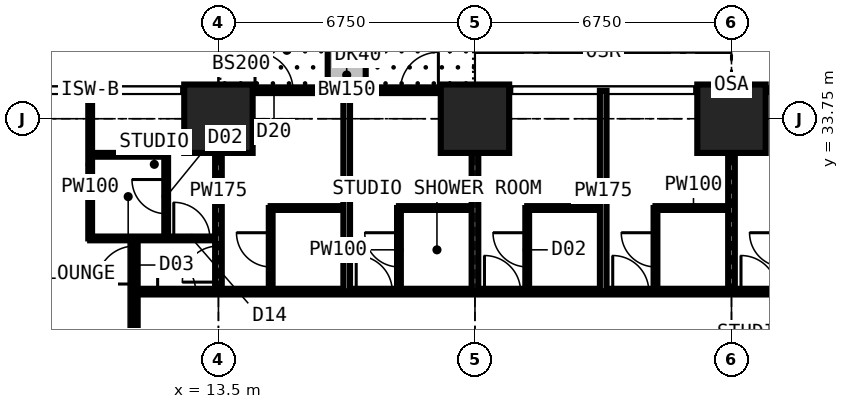
"""IFC4 building model, lengths in metres.
Left out: names, types, materials, properties, quantities, classifications, styles, units other than length and angle.
Written with IfcOpenShell. Run it as: python <this file> out.ifc"""

import sys

from ifc_helpers import new_model, si_unit, direction, frame, frame_2d, origin, origin_2d, place, context, subcontext, project, spatial, rectangle, extrude, element, fill, save


model = new_model("IFC4")
c1 = context("Model", 3, precision=1e-05, world=origin(), true_north=direction((0.0, 1.0)))
c2 = subcontext(c1, "Body", "Model", "MODEL_VIEW")
j1 = project(units=[si_unit("LENGTHUNIT", "METRE"), si_unit("PLANEANGLEUNIT", "RADIAN")], contexts=[c1])
p1 = place(None, origin())
s1 = spatial("IfcSite", under=j1, at=p1, CompositionType="ELEMENT")
p2 = place(p1, origin())
s2 = spatial("IfcBuilding", under=s1, at=p2, CompositionType="ELEMENT")
p3 = place(p2, frame((0.0, 0.0, 87.3)))
s3 = spatial("IfcBuildingStorey", under=s2, at=p3, CompositionType="ELEMENT", Elevation=87.3)
for number, where, z_axis, x_axis in (
    (1, (13.5, 33.75, 0.0), (0.0, 0.0, 1.0), (1.0, 0.0, 0.0)),
    (2, (20.25, 33.75, 0.0), (0.0, 0.0, 1.0), (1.0, 0.0, 0.0)),
    (3, (27.0, 33.75, 0.0), (0.0, 0.0, 1.0), (1.0, 0.0, 0.0)),
):
    element("IfcColumn", number, at=place(p3, frame(where, z_axis=z_axis, x_axis=x_axis)), inside=s3, PredefinedType="COLUMN", context=c2, shape_type="SweptSolid", body=[
        extrude(rectangle(XDim=1.8, YDim=1.8, at=origin_2d()), origin(), (0.0, 0.0, 1.0), 3.6),
    ])
p4 = place(p3, frame((13.5, 34.5, 0.0), z_axis=(0.0, 0.0, 1.0), x_axis=(1.0, 0.0, 0.0)))
e4 = element("IfcWall", 4, at=p4, inside=s3, PredefinedType="SOLIDWALL", context=c2, shape_type="SweptSolid", body=[
    extrude(rectangle(XDim=6.75, YDim=0.15, at=frame_2d((3.375, 0.0))), origin(), (0.0, 0.0, 1.0), 3.375),
])
p5 = place(p4, frame((0.962, 0.0, 0.0)))
e5 = element("IfcOpeningElement", 5, at=p5, cuts=e4, PredefinedType="OPENING", context=c2, shape_type="SweptSolid", body=[
    extrude(rectangle(XDim=1.0, YDim=2.2, at=frame_2d((0.5, 1.1))), frame((0.0, 0.085, 0.0), z_axis=(0.0, -1.0, 0.0), x_axis=(1.0, 0.0, 0.0)), (0.0, 0.0, 1.0), 0.17),
])
p6 = place(p4, frame((2.025, 0.0, 0.9)))
e6 = element("IfcOpeningElement", 6, at=p6, cuts=e4, PredefinedType="OPENING", context=c2, shape_type="SweptSolid", body=[
    extrude(rectangle(XDim=1.2, YDim=1.8, at=frame_2d((0.6, 0.9))), frame((0.0, 0.085, 0.0), z_axis=(0.0, -1.0, 0.0), x_axis=(1.0, 0.0, 0.0)), (0.0, 0.0, 1.0), 0.17),
])
p7 = place(p4, frame((4.788, 0.0, 0.0)))
e7 = element("IfcOpeningElement", 7, at=p7, cuts=e4, PredefinedType="OPENING", context=c2, shape_type="SweptSolid", body=[
    extrude(rectangle(XDim=1.0, YDim=2.2, at=frame_2d((0.5, 1.1))), frame((0.0, 0.085, 0.0), z_axis=(0.0, -1.0, 0.0), x_axis=(1.0, 0.0, 0.0)), (0.0, 0.0, 1.0), 0.17),
])
p8 = place(p4, frame((3.525, 0.0, 0.9)))
e8 = element("IfcOpeningElement", 8, at=p8, cuts=e4, PredefinedType="OPENING", context=c2, shape_type="SweptSolid", body=[
    extrude(rectangle(XDim=1.2, YDim=1.8, at=frame_2d((0.6, 0.9))), frame((0.0, 0.085, 0.0), z_axis=(0.0, -1.0, 0.0), x_axis=(1.0, 0.0, 0.0)), (0.0, 0.0, 1.0), 0.17),
])
p9 = place(p3, frame((16.875, 34.6, 0.0), z_axis=(0.0, 0.0, 1.0), x_axis=(0.0, 1.0, 0.0)))
e9 = element("IfcWall", 9, at=p9, inside=s3, PredefinedType="USERDEFINED", context=c2, shape_type="SweptSolid", body=[
    extrude(rectangle(XDim=2.2, YDim=1.0, at=frame_2d((1.1, 0.0))), origin(), (0.0, 0.0, 1.0), 0.9),
])
p10 = place(p3, frame((10.125, 30.6, 0.0), z_axis=(0.0, 0.0, 1.0), x_axis=(0.0, 1.0, 0.0)))
e10 = element("IfcWall", 10, at=p10, inside=s3, PredefinedType="PARTITIONING", context=c2, shape_type="SweptSolid", body=[
    extrude(rectangle(XDim=3.884, YDim=0.1, at=frame_2d((1.942, 0.0))), origin(), (0.0, 0.0, 1.0), 3.375),
])
p11 = place(p3, frame((10.125, 30.6, 0.0), z_axis=(0.0, 0.0, 1.0), x_axis=(1.0, 0.0, 0.0)))
e11 = element("IfcWall", 11, at=p11, inside=s3, PredefinedType="PARTITIONING", context=c2, shape_type="SweptSolid", body=[
    extrude(rectangle(XDim=3.375, YDim=0.1, at=frame_2d((1.688, 0.0))), origin(), (0.0, 0.0, 1.0), 3.375),
])
p12 = place(p11, frame((2.2, 0.0, 0.0)))
e12 = element("IfcOpeningElement", 12, at=p12, cuts=e11, PredefinedType="OPENING", context=c2, shape_type="SweptSolid", body=[
    extrude(rectangle(XDim=0.95, YDim=2.2, at=frame_2d((0.475, 1.1))), frame((0.0, 0.06, 0.0), z_axis=(0.0, -1.0, 0.0), x_axis=(1.0, 0.0, 0.0)), (0.0, 0.0, 1.0), 0.12),
])
p13 = place(p3, frame((10.125, 32.8, 0.0), z_axis=(0.0, 0.0, 1.0), x_axis=(1.0, 0.0, 0.0)))
e13 = element("IfcWall", 13, at=p13, inside=s3, PredefinedType="PARTITIONING", context=c2, shape_type="SweptSolid", body=[
    extrude(rectangle(XDim=2.0, YDim=0.1, at=frame_2d((1.0, 0.0))), origin(), (0.0, 0.0, 1.0), 3.375),
])
p14 = place(p3, frame((11.3, 11.3, 0.0), z_axis=(0.0, 0.0, 1.0), x_axis=(0.0, 1.0, 0.0)))
e14 = element("IfcWall", 14, at=p14, inside=s3, PredefinedType="PARTITIONING", context=c2, shape_type="SweptSolid", body=[
    extrude(rectangle(XDim=19.3, YDim=0.15, at=frame_2d((9.65, 0.0))), origin(), (0.0, 0.0, 1.0), 3.375),
])
p15 = place(p14, frame((18.1, 0.0, 0.0)))
e15 = element("IfcOpeningElement", 15, at=p15, cuts=e14, PredefinedType="OPENING", context=c2, shape_type="SweptSolid", body=[
    extrude(rectangle(XDim=1.0, YDim=2.2, at=frame_2d((0.5, 1.1))), frame((0.0, 0.085, 0.0), z_axis=(0.0, -1.0, 0.0), x_axis=(1.0, 0.0, 0.0)), (0.0, 0.0, 1.0), 0.17),
])
p16 = place(p14, frame((10.137, 0.0, 0.0)))
e16 = element("IfcOpeningElement", 16, at=p16, cuts=e14, PredefinedType="OPENING", context=c2, shape_type="SweptSolid", body=[
    extrude(rectangle(XDim=1.0, YDim=2.2, at=frame_2d((0.5, 1.1))), frame((0.0, 0.085, 0.0), z_axis=(0.0, -1.0, 0.0), x_axis=(1.0, 0.0, 0.0)), (0.0, 0.0, 1.0), 0.17),
])
p17 = place(p3, frame((11.3, 29.2, 0.0), z_axis=(0.0, 0.0, 1.0), x_axis=(1.0, 0.0, 0.0)))
e17 = element("IfcWall", 17, at=p17, inside=s3, PredefinedType="PARTITIONING", context=c2, shape_type="SweptSolid", body=[
    extrude(rectangle(XDim=19.075, YDim=0.15, at=frame_2d((9.538, 0.0))), origin(), (0.0, 0.0, 1.0), 3.375),
])
p18 = place(p17, frame((5.825, 0.0, 0.0)))
e18 = element("IfcOpeningElement", 18, at=p18, cuts=e17, PredefinedType="OPENING", context=c2, shape_type="SweptSolid", body=[
    extrude(rectangle(XDim=0.95, YDim=2.2, at=frame_2d((0.475, 1.1))), frame((0.0, 0.085, 0.0), z_axis=(0.0, -1.0, 0.0), x_axis=(1.0, 0.0, 0.0)), (0.0, 0.0, 1.0), 0.17),
])
p19 = place(p17, frame((9.2, 0.0, 0.0)))
e19 = element("IfcOpeningElement", 19, at=p19, cuts=e17, PredefinedType="OPENING", context=c2, shape_type="SweptSolid", body=[
    extrude(rectangle(XDim=0.95, YDim=2.2, at=frame_2d((0.475, 1.1))), frame((0.0, 0.085, 0.0), z_axis=(0.0, -1.0, 0.0), x_axis=(1.0, 0.0, 0.0)), (0.0, 0.0, 1.0), 0.17),
])
p20 = place(p17, frame((12.575, 0.0, 0.0)))
e20 = element("IfcOpeningElement", 20, at=p20, cuts=e17, PredefinedType="OPENING", context=c2, shape_type="SweptSolid", body=[
    extrude(rectangle(XDim=0.95, YDim=2.2, at=frame_2d((0.475, 1.1))), frame((0.0, 0.085, 0.0), z_axis=(0.0, -1.0, 0.0), x_axis=(1.0, 0.0, 0.0)), (0.0, 0.0, 1.0), 0.17),
])
p21 = place(p17, frame((15.95, 0.0, 0.0)))
e21 = element("IfcOpeningElement", 21, at=p21, cuts=e17, PredefinedType="OPENING", context=c2, shape_type="SweptSolid", body=[
    extrude(rectangle(XDim=0.95, YDim=2.2, at=frame_2d((0.475, 1.1))), frame((0.0, 0.085, 0.0), z_axis=(0.0, -1.0, 0.0), x_axis=(1.0, 0.0, 0.0)), (0.0, 0.0, 1.0), 0.17),
])
p22 = place(p17, frame((0.6, 0.0, 0.0)))
e22 = element("IfcOpeningElement", 22, at=p22, cuts=e17, PredefinedType="OPENING", context=c2, shape_type="SweptSolid", body=[
    extrude(rectangle(XDim=1.0, YDim=2.2, at=frame_2d((0.5, 1.1))), frame((0.0, 0.085, 0.0), z_axis=(0.0, -1.0, 0.0), x_axis=(1.0, 0.0, 0.0)), (0.0, 0.0, 1.0), 0.17),
])
p23 = place(p3, frame((12.125, 30.6, 0.0), z_axis=(0.0, 0.0, 1.0), x_axis=(0.0, 1.0, 0.0)))
e23 = element("IfcWall", 23, at=p23, inside=s3, PredefinedType="PARTITIONING", context=c2, shape_type="SweptSolid", body=[
    extrude(rectangle(XDim=2.2, YDim=0.1, at=frame_2d((1.1, 0.0))), origin(), (0.0, 0.0, 1.0), 3.375),
])
p24 = place(p23, frame((0.65, 0.0, 0.0)))
e24 = element("IfcOpeningElement", 24, at=p24, cuts=e23, PredefinedType="OPENING", context=c2, shape_type="SweptSolid", body=[
    extrude(rectangle(XDim=0.9, YDim=2.2, at=frame_2d((0.45, 1.1))), frame((0.0, 0.06, 0.0), z_axis=(0.0, -1.0, 0.0), x_axis=(1.0, 0.0, 0.0)), (0.0, 0.0, 1.0), 0.12),
])
p25 = place(p3, frame((13.5, 29.2, 0.0), z_axis=(0.0, 0.0, 1.0), x_axis=(0.0, 1.0, 0.0)))
e25 = element("IfcWall", 25, at=p25, inside=s3, PredefinedType="PARTITIONING", context=c2, shape_type="SweptSolid", body=[
    extrude(rectangle(XDim=5.284, YDim=0.175, at=frame_2d((2.642, 0.0))), origin(), (0.0, 0.0, 1.0), 2.806),
])
p26 = place(p25, frame((0.25, 0.0, 0.0)))
e26 = element("IfcOpeningElement", 26, at=p26, cuts=e25, PredefinedType="OPENING", context=c2, shape_type="SweptSolid", body=[
    extrude(rectangle(XDim=0.95, YDim=2.2, at=frame_2d((0.475, 1.1))), frame((0.0, 0.097, 0.0), z_axis=(0.0, -1.0, 0.0), x_axis=(1.0, 0.0, 0.0)), (0.0, 0.0, 1.0), 0.195),
])
p27 = place(p3, frame((14.875, 29.2, 0.0), z_axis=(0.0, 0.0, 1.0), x_axis=(0.0, 1.0, 0.0)))
e27 = element("IfcWall", 27, at=p27, inside=s3, PredefinedType="PARTITIONING", context=c2, shape_type="SweptSolid", body=[
    extrude(rectangle(XDim=2.2, YDim=0.1, at=frame_2d((1.1, 0.0))), origin(), (0.0, 0.0, 1.0), 3.375),
])
p28 = place(p27, frame((0.65, 0.0, 0.0)))
e28 = element("IfcOpeningElement", 28, at=p28, cuts=e27, PredefinedType="OPENING", context=c2, shape_type="SweptSolid", body=[
    extrude(rectangle(XDim=0.9, YDim=2.2, at=frame_2d((0.45, 1.1))), frame((0.0, 0.06, 0.0), z_axis=(0.0, -1.0, 0.0), x_axis=(1.0, 0.0, 0.0)), (0.0, 0.0, 1.0), 0.12),
])
p29 = place(p3, frame((14.875, 31.4, 0.0), z_axis=(0.0, 0.0, 1.0), x_axis=(1.0, 0.0, 0.0)))
e29 = element("IfcWall", 29, at=p29, inside=s3, PredefinedType="PARTITIONING", context=c2, shape_type="SweptSolid", body=[
    extrude(rectangle(XDim=2.0, YDim=0.1, at=frame_2d((1.0, 0.0))), origin(), (0.0, 0.0, 1.0), 3.375),
])
p30 = place(p3, frame((16.875, 29.2, 0.0), z_axis=(0.0, 0.0, 1.0), x_axis=(0.0, 1.0, 0.0)))
e30 = element("IfcWall", 30, at=p30, inside=s3, PredefinedType="PARTITIONING", context=c2, shape_type="SweptSolid", body=[
    extrude(rectangle(XDim=5.284, YDim=0.175, at=frame_2d((2.642, 0.0))), origin(), (0.0, 0.0, 1.0), 3.375),
])
p31 = place(p3, frame((18.25, 29.2, 0.0), z_axis=(0.0, 0.0, 1.0), x_axis=(0.0, 1.0, 0.0)))
e31 = element("IfcWall", 31, at=p31, inside=s3, PredefinedType="PARTITIONING", context=c2, shape_type="SweptSolid", body=[
    extrude(rectangle(XDim=2.2, YDim=0.1, at=frame_2d((1.1, 0.0))), origin(), (0.0, 0.0, 1.0), 3.375),
])
p32 = place(p31, frame((0.65, 0.0, 0.0)))
e32 = element("IfcOpeningElement", 32, at=p32, cuts=e31, PredefinedType="OPENING", context=c2, shape_type="SweptSolid", body=[
    extrude(rectangle(XDim=0.9, YDim=2.2, at=frame_2d((0.45, 1.1))), frame((0.0, 0.06, 0.0), z_axis=(0.0, -1.0, 0.0), x_axis=(1.0, 0.0, 0.0)), (0.0, 0.0, 1.0), 0.12),
])
p33 = place(p3, frame((18.25, 31.4, 0.0), z_axis=(0.0, 0.0, 1.0), x_axis=(1.0, 0.0, 0.0)))
e33 = element("IfcWall", 33, at=p33, inside=s3, PredefinedType="PARTITIONING", context=c2, shape_type="SweptSolid", body=[
    extrude(rectangle(XDim=2.0, YDim=0.1, at=frame_2d((1.0, 0.0))), origin(), (0.0, 0.0, 1.0), 3.375),
])
p34 = place(p3, frame((20.25, 29.2, 0.0), z_axis=(0.0, 0.0, 1.0), x_axis=(0.0, 1.0, 0.0)))
e34 = element("IfcWall", 34, at=p34, inside=s3, PredefinedType="PARTITIONING", context=c2, shape_type="SweptSolid", body=[
    extrude(rectangle(XDim=5.284, YDim=0.175, at=frame_2d((2.642, 0.0))), origin(), (0.0, 0.0, 1.0), 2.61),
])
p35 = place(p3, frame((21.625, 29.2, 0.0), z_axis=(0.0, 0.0, 1.0), x_axis=(0.0, 1.0, 0.0)))
e35 = element("IfcWall", 35, at=p35, inside=s3, PredefinedType="PARTITIONING", context=c2, shape_type="SweptSolid", body=[
    extrude(rectangle(XDim=2.2, YDim=0.1, at=frame_2d((1.1, 0.0))), origin(), (0.0, 0.0, 1.0), 3.375),
])
p36 = place(p35, frame((0.65, 0.0, 0.0)))
e36 = element("IfcOpeningElement", 36, at=p36, cuts=e35, PredefinedType="OPENING", context=c2, shape_type="SweptSolid", body=[
    extrude(rectangle(XDim=0.9, YDim=2.2, at=frame_2d((0.45, 1.1))), frame((0.0, 0.06, 0.0), z_axis=(0.0, -1.0, 0.0), x_axis=(1.0, 0.0, 0.0)), (0.0, 0.0, 1.0), 0.12),
])
p37 = place(p3, frame((21.625, 31.4, 0.0), z_axis=(0.0, 0.0, 1.0), x_axis=(1.0, 0.0, 0.0)))
e37 = element("IfcWall", 37, at=p37, inside=s3, PredefinedType="PARTITIONING", context=c2, shape_type="SweptSolid", body=[
    extrude(rectangle(XDim=2.0, YDim=0.1, at=frame_2d((1.0, 0.0))), origin(), (0.0, 0.0, 1.0), 3.375),
])
p38 = place(p3, frame((23.625, 29.2, 0.0), z_axis=(0.0, 0.0, 1.0), x_axis=(0.0, 1.0, 0.0)))
e38 = element("IfcWall", 38, at=p38, inside=s3, PredefinedType="PARTITIONING", context=c2, shape_type="SweptSolid", body=[
    extrude(rectangle(XDim=5.284, YDim=0.175, at=frame_2d((2.642, 0.0))), origin(), (0.0, 0.0, 1.0), 3.375),
])
p39 = place(p3, frame((25.0, 29.2, 0.0), z_axis=(0.0, 0.0, 1.0), x_axis=(0.0, 1.0, 0.0)))
e39 = element("IfcWall", 39, at=p39, inside=s3, PredefinedType="PARTITIONING", context=c2, shape_type="SweptSolid", body=[
    extrude(rectangle(XDim=2.2, YDim=0.1, at=frame_2d((1.1, 0.0))), origin(), (0.0, 0.0, 1.0), 3.375),
])
p40 = place(p39, frame((0.65, 0.0, 0.0)))
e40 = element("IfcOpeningElement", 40, at=p40, cuts=e39, PredefinedType="OPENING", context=c2, shape_type="SweptSolid", body=[
    extrude(rectangle(XDim=0.9, YDim=2.2, at=frame_2d((0.45, 1.1))), frame((0.0, 0.06, 0.0), z_axis=(0.0, -1.0, 0.0), x_axis=(1.0, 0.0, 0.0)), (0.0, 0.0, 1.0), 0.12),
])
p41 = place(p3, frame((25.0, 31.4, 0.0), z_axis=(0.0, 0.0, 1.0), x_axis=(1.0, 0.0, 0.0)))
e41 = element("IfcWall", 41, at=p41, inside=s3, PredefinedType="PARTITIONING", context=c2, shape_type="SweptSolid", body=[
    extrude(rectangle(XDim=2.0, YDim=0.1, at=frame_2d((1.0, 0.0))), origin(), (0.0, 0.0, 1.0), 3.375),
])
p42 = place(p3, frame((27.0, 29.2, 0.0), z_axis=(0.0, 0.0, 1.0), x_axis=(0.0, 1.0, 0.0)))
e42 = element("IfcWall", 42, at=p42, inside=s3, PredefinedType="PARTITIONING", context=c2, shape_type="SweptSolid", body=[
    extrude(rectangle(XDim=5.284, YDim=0.175, at=frame_2d((2.642, 0.0))), origin(), (0.0, 0.0, 1.0), 2.61),
])
p43 = place(p5, origin())
e43 = element("IfcDoor", 43, at=p43, inside=s3, OperationType="SINGLE_SWING_LEFT", PredefinedType="DOOR", context=c2, shape_type="SweptSolid", body=[
    extrude(rectangle(XDim=1.0, YDim=2.2, at=frame_2d((0.5, 1.1))), frame((0.0, 0.025, 0.0), z_axis=(0.0, -1.0, 0.0), x_axis=(1.0, 0.0, 0.0)), (0.0, 0.0, 1.0), 0.05),
])
fill(e5, e43)
p44 = place(p6, origin())
e44 = element("IfcWindow", 44, at=p44, inside=s3, PartitioningType="SINGLE_PANEL", PredefinedType="WINDOW", context=c2, shape_type="SweptSolid", body=[
    extrude(rectangle(XDim=1.2, YDim=1.8, at=frame_2d((0.6, 0.9))), frame((0.0, 0.03, 0.0), z_axis=(0.0, -1.0, 0.0), x_axis=(1.0, 0.0, 0.0)), (0.0, 0.0, 1.0), 0.06),
])
fill(e6, e44)
p45 = place(p7, origin())
e45 = element("IfcDoor", 45, at=p45, inside=s3, OperationType="SINGLE_SWING_RIGHT", PredefinedType="DOOR", context=c2, shape_type="SweptSolid", body=[
    extrude(rectangle(XDim=1.0, YDim=2.2, at=frame_2d((0.5, 1.1))), frame((0.0, 0.025, 0.0), z_axis=(0.0, -1.0, 0.0), x_axis=(1.0, 0.0, 0.0)), (0.0, 0.0, 1.0), 0.05),
])
fill(e7, e45)
p46 = place(p8, origin())
e46 = element("IfcWindow", 46, at=p46, inside=s3, PartitioningType="SINGLE_PANEL", PredefinedType="WINDOW", context=c2, shape_type="SweptSolid", body=[
    extrude(rectangle(XDim=1.2, YDim=1.8, at=frame_2d((0.6, 0.9))), frame((0.0, 0.03, 0.0), z_axis=(0.0, -1.0, 0.0), x_axis=(1.0, 0.0, 0.0)), (0.0, 0.0, 1.0), 0.06),
])
fill(e8, e46)
p47 = place(p12, origin())
e47 = element("IfcDoor", 47, at=p47, inside=s3, OperationType="SINGLE_SWING_LEFT", PredefinedType="DOOR", context=c2, shape_type="SweptSolid", body=[
    extrude(rectangle(XDim=0.95, YDim=2.2, at=frame_2d((0.475, 1.1))), frame((0.0, 0.025, 0.0), z_axis=(0.0, -1.0, 0.0), x_axis=(1.0, 0.0, 0.0)), (0.0, 0.0, 1.0), 0.05),
])
fill(e12, e47)
p48 = place(p24, origin())
e48 = element("IfcDoor", 48, at=p48, inside=s3, OperationType="SINGLE_SWING_RIGHT", PredefinedType="DOOR", context=c2, shape_type="SweptSolid", body=[
    extrude(rectangle(XDim=0.9, YDim=2.2, at=frame_2d((0.45, 1.1))), frame((0.0, 0.025, 0.0), z_axis=(0.0, -1.0, 0.0), x_axis=(1.0, 0.0, 0.0)), (0.0, 0.0, 1.0), 0.05),
])
fill(e24, e48)
p49 = place(p26, origin())
e49 = element("IfcDoor", 49, at=p49, inside=s3, OperationType="SINGLE_SWING_LEFT", PredefinedType="DOOR", context=c2, shape_type="SweptSolid", body=[
    extrude(rectangle(XDim=0.95, YDim=2.2, at=frame_2d((0.475, 1.1))), frame((0.0, 0.025, 0.0), z_axis=(0.0, -1.0, 0.0), x_axis=(1.0, 0.0, 0.0)), (0.0, 0.0, 1.0), 0.05),
])
fill(e26, e49)
p50 = place(p28, origin())
e50 = element("IfcDoor", 50, at=p50, inside=s3, OperationType="SINGLE_SWING_RIGHT", PredefinedType="DOOR", context=c2, shape_type="SweptSolid", body=[
    extrude(rectangle(XDim=0.9, YDim=2.2, at=frame_2d((0.45, 1.1))), frame((0.0, 0.025, 0.0), z_axis=(0.0, -1.0, 0.0), x_axis=(1.0, 0.0, 0.0)), (0.0, 0.0, 1.0), 0.05),
])
fill(e28, e50)
p51 = place(p18, origin())
e51 = element("IfcDoor", 51, at=p51, inside=s3, OperationType="SINGLE_SWING_LEFT", PredefinedType="DOOR", context=c2, shape_type="SweptSolid", body=[
    extrude(rectangle(XDim=0.95, YDim=2.2, at=frame_2d((0.475, 1.1))), frame((0.0, 0.025, 0.0), z_axis=(0.0, -1.0, 0.0), x_axis=(1.0, 0.0, 0.0)), (0.0, 0.0, 1.0), 0.05),
])
fill(e18, e51)
p52 = place(p32, origin())
e52 = element("IfcDoor", 52, at=p52, inside=s3, OperationType="SINGLE_SWING_RIGHT", PredefinedType="DOOR", context=c2, shape_type="SweptSolid", body=[
    extrude(rectangle(XDim=0.9, YDim=2.2, at=frame_2d((0.45, 1.1))), frame((0.0, 0.025, 0.0), z_axis=(0.0, -1.0, 0.0), x_axis=(1.0, 0.0, 0.0)), (0.0, 0.0, 1.0), 0.05),
])
fill(e32, e52)
p53 = place(p19, origin())
e53 = element("IfcDoor", 53, at=p53, inside=s3, OperationType="SINGLE_SWING_LEFT", PredefinedType="DOOR", context=c2, shape_type="SweptSolid", body=[
    extrude(rectangle(XDim=0.95, YDim=2.2, at=frame_2d((0.475, 1.1))), frame((0.0, 0.025, 0.0), z_axis=(0.0, -1.0, 0.0), x_axis=(1.0, 0.0, 0.0)), (0.0, 0.0, 1.0), 0.05),
])
fill(e19, e53)
p54 = place(p36, origin())
e54 = element("IfcDoor", 54, at=p54, inside=s3, OperationType="SINGLE_SWING_RIGHT", PredefinedType="DOOR", context=c2, shape_type="SweptSolid", body=[
    extrude(rectangle(XDim=0.9, YDim=2.2, at=frame_2d((0.45, 1.1))), frame((0.0, 0.025, 0.0), z_axis=(0.0, -1.0, 0.0), x_axis=(1.0, 0.0, 0.0)), (0.0, 0.0, 1.0), 0.05),
])
fill(e36, e54)
p55 = place(p20, origin())
e55 = element("IfcDoor", 55, at=p55, inside=s3, OperationType="SINGLE_SWING_LEFT", PredefinedType="DOOR", context=c2, shape_type="SweptSolid", body=[
    extrude(rectangle(XDim=0.95, YDim=2.2, at=frame_2d((0.475, 1.1))), frame((0.0, 0.025, 0.0), z_axis=(0.0, -1.0, 0.0), x_axis=(1.0, 0.0, 0.0)), (0.0, 0.0, 1.0), 0.05),
])
fill(e20, e55)
p56 = place(p40, origin())
e56 = element("IfcDoor", 56, at=p56, inside=s3, OperationType="SINGLE_SWING_RIGHT", PredefinedType="DOOR", context=c2, shape_type="SweptSolid", body=[
    extrude(rectangle(XDim=0.9, YDim=2.2, at=frame_2d((0.45, 1.1))), frame((0.0, 0.025, 0.0), z_axis=(0.0, -1.0, 0.0), x_axis=(1.0, 0.0, 0.0)), (0.0, 0.0, 1.0), 0.05),
])
fill(e40, e56)
p57 = place(p21, origin())
e57 = element("IfcDoor", 57, at=p57, inside=s3, OperationType="SINGLE_SWING_LEFT", PredefinedType="DOOR", context=c2, shape_type="SweptSolid", body=[
    extrude(rectangle(XDim=0.95, YDim=2.2, at=frame_2d((0.475, 1.1))), frame((0.0, 0.025, 0.0), z_axis=(0.0, -1.0, 0.0), x_axis=(1.0, 0.0, 0.0)), (0.0, 0.0, 1.0), 0.05),
])
fill(e21, e57)
p58 = place(p22, origin())
e58 = element("IfcDoor", 58, at=p58, inside=s3, OperationType="SINGLE_SWING_LEFT", PredefinedType="DOOR", context=c2, shape_type="SweptSolid", body=[
    extrude(rectangle(XDim=1.0, YDim=2.2, at=frame_2d((0.5, 1.1))), frame((0.0, 0.025, 0.0), z_axis=(0.0, -1.0, 0.0), x_axis=(1.0, 0.0, 0.0)), (0.0, 0.0, 1.0), 0.05),
])
fill(e22, e58)
p59 = place(p15, origin())
e59 = element("IfcDoor", 59, at=p59, inside=s3, OperationType="SINGLE_SWING_LEFT", PredefinedType="DOOR", context=c2, shape_type="SweptSolid", body=[
    extrude(rectangle(XDim=1.0, YDim=2.2, at=frame_2d((0.5, 1.1))), frame((0.0, 0.025, 0.0), z_axis=(0.0, -1.0, 0.0), x_axis=(1.0, 0.0, 0.0)), (0.0, 0.0, 1.0), 0.05),
])
fill(e15, e59)
save(model, sys.argv[1])
